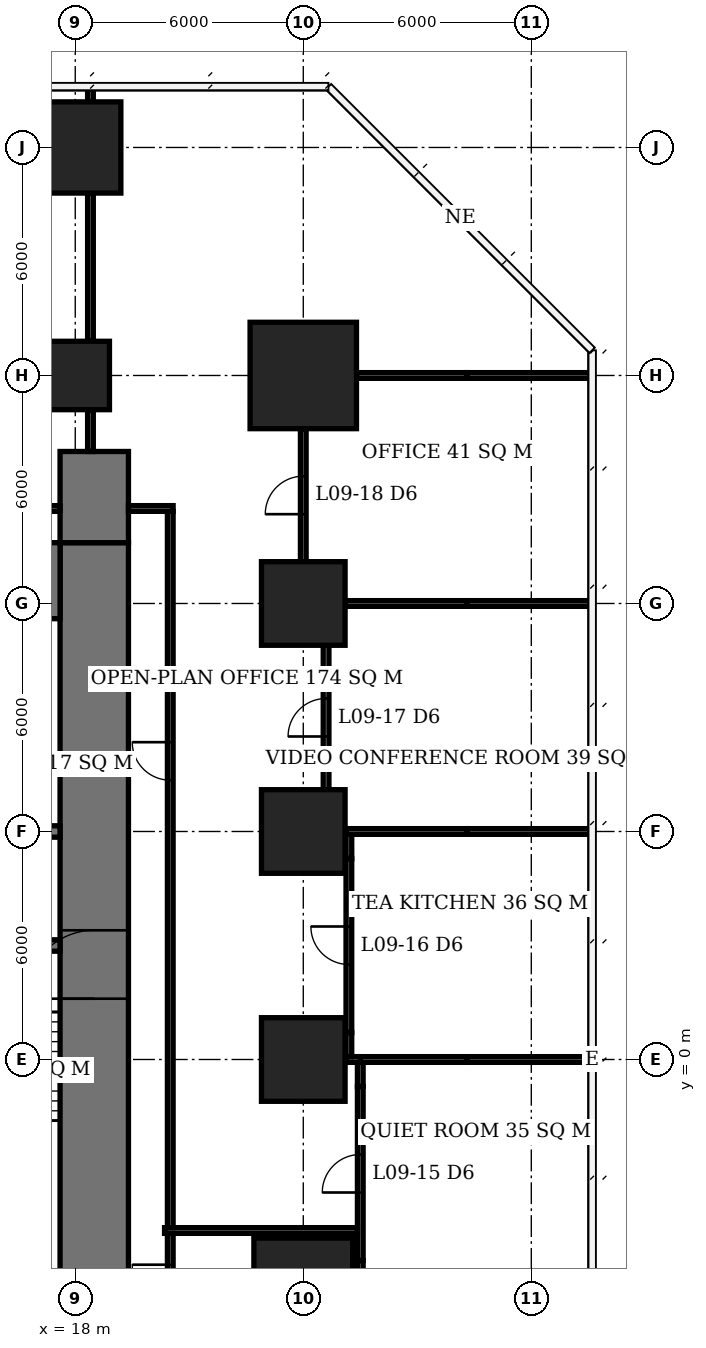
"""IFC4 building model, lengths in metres.
Left out: names, types, materials, properties, quantities, classifications, styles, units other than length and angle.
Written with IfcOpenShell. Run it as: python <this file> out.ifc"""

import sys

from ifc_helpers import new_model, si_unit, direction, frame, frame_2d, origin, origin_2d, place, context, subcontext, project, spatial, rectangle, extrude, element, fill, save


model = new_model("IFC4")
c1 = context("Model", 3, precision=1e-05, world=origin(), true_north=direction((0.0, 1.0)))
c2 = subcontext(c1, "Body", "Model", "MODEL_VIEW")
j1 = project(units=[si_unit("LENGTHUNIT", "METRE"), si_unit("PLANEANGLEUNIT", "RADIAN")], contexts=[c1])
p1 = place(None, origin())
s1 = spatial("IfcSite", under=j1, at=p1, CompositionType="ELEMENT")
p2 = place(p1, origin())
s2 = spatial("IfcBuilding", under=s1, at=p2, CompositionType="ELEMENT")
p3 = place(p2, frame((0.0, 0.0, 41.6)))
s3 = spatial("IfcBuildingStorey", under=s2, at=p3, CompositionType="ELEMENT", Elevation=41.6)
p4 = place(p3, frame((18.0, 18.0, 0.0), z_axis=(0.0, 0.0, 1.0), x_axis=(1.0, 0.0, 0.0)))
e1 = element("IfcColumn", 1, at=p4, inside=s3, PredefinedType="COLUMN", context=c2, shape_type="SweptSolid", body=[
    extrude(rectangle(XDim=1.8, YDim=1.8, at=origin_2d()), origin(), (0.0, 0.0, 1.0), 3.9),
])
p5 = place(p3, frame((18.0, 24.0, 0.0), z_axis=(0.0, 0.0, 1.0), x_axis=(1.0, 0.0, 0.0)))
e2 = element("IfcColumn", 2, at=p5, inside=s3, PredefinedType="COLUMN", context=c2, shape_type="SweptSolid", body=[
    extrude(rectangle(XDim=2.4, YDim=2.4, at=origin_2d()), origin(), (0.0, 0.0, 1.0), 3.9),
])
p6 = place(p3, frame((24.0, -6.0, 0.0), z_axis=(0.0, 0.0, 1.0), x_axis=(1.0, 0.0, 0.0)))
e3 = element("IfcColumn", 3, at=p6, inside=s3, PredefinedType="COLUMN", context=c2, shape_type="SweptSolid", body=[
    extrude(rectangle(XDim=2.6, YDim=2.6, at=origin_2d()), origin(), (0.0, 0.0, 1.0), 3.9),
])
for number, where, z_axis, x_axis in (
    (4, (24.0, 0.0, 0.0), (0.0, 0.0, 1.0), (1.0, 0.0, 0.0)),
    (5, (24.0, 6.0, 0.0), (0.0, 0.0, 1.0), (1.0, 0.0, 0.0)),
    (6, (24.0, 12.0, 0.0), (0.0, 0.0, 1.0), (1.0, 0.0, 0.0)),
):
    element("IfcColumn", number, at=place(p3, frame(where, z_axis=z_axis, x_axis=x_axis)), inside=s3, PredefinedType="COLUMN", context=c2, shape_type="SweptSolid", body=[
        extrude(rectangle(XDim=2.2, YDim=2.2, at=origin_2d()), origin(), (0.0, 0.0, 1.0), 3.9),
    ])
p7 = place(p3, frame((24.0, 18.0, 0.0), z_axis=(0.0, 0.0, 1.0), x_axis=(1.0, 0.0, 0.0)))
e7 = element("IfcColumn", 7, at=p7, inside=s3, PredefinedType="COLUMN", context=c2, shape_type="SweptSolid", body=[
    extrude(rectangle(XDim=2.8, YDim=2.8, at=origin_2d()), origin(), (0.0, 0.0, 1.0), 3.9),
])
p8 = place(p3, frame((-5.6, 12.6, 0.0), z_axis=(0.0, 0.0, 1.0), x_axis=(1.0, 0.0, 0.0)))
e8 = element("IfcWall", 8, at=p8, inside=s3, PredefinedType="SHEAR", context=c2, shape_type="SweptSolid", body=[
    extrude(rectangle(XDim=23.2, YDim=2.0, at=frame_2d((11.6, 0.0))), origin(), (0.0, 0.0, 1.0), 3.9),
])
p9 = place(p3, frame((18.5, -7.6, 0.0), z_axis=(0.0, 0.0, 1.0), x_axis=(0.0, 1.0, 0.0)))
e9 = element("IfcWall", 9, at=p9, inside=s3, PredefinedType="SHEAR", context=c2, shape_type="SweptSolid", body=[
    extrude(rectangle(XDim=21.2, YDim=1.8, at=frame_2d((10.6, 0.0))), origin(), (0.0, 0.0, 1.0), 3.9),
])
p10 = place(p9, frame((9.2, 0.0, 0.0)))
e10 = element("IfcOpeningElement", 10, at=p10, cuts=e9, PredefinedType="OPENING", context=c2, shape_type="SweptSolid", body=[
    extrude(rectangle(XDim=1.8, YDim=2.4, at=frame_2d((0.9, 1.2))), frame((0.0, 0.91, 0.0), z_axis=(0.0, -1.0, 0.0), x_axis=(1.0, 0.0, 0.0)), (0.0, 0.0, 1.0), 1.82),
])
p11 = place(p3, frame((18.5, 13.6, 0.0), z_axis=(0.0, 0.0, 1.0), x_axis=(0.0, 1.0, 0.0)))
e11 = element("IfcWall", 11, at=p11, inside=s3, PredefinedType="SHEAR", context=c2, shape_type="SweptSolid", body=[
    extrude(rectangle(XDim=2.4, YDim=1.8, at=frame_2d((1.2, 0.0))), origin(), (0.0, 0.0, 1.0), 3.9),
])
p12 = place(p3, frame((12.15, 3.0, 0.0), z_axis=(0.0, 0.0, 1.0), x_axis=(1.0, 0.0, 0.0)))
e12 = element("IfcWall", 12, at=p12, inside=s3, PredefinedType="SHEAR", context=c2, shape_type="SweptSolid", body=[
    extrude(rectangle(XDim=5.45, YDim=0.3, at=frame_2d((2.725, 0.0))), origin(), (0.0, 0.0, 1.0), 3.9),
])
p13 = place(p12, frame((3.25, 0.0, 0.0)))
e13 = element("IfcOpeningElement", 13, at=p13, cuts=e12, PredefinedType="OPENING", context=c2, shape_type="SweptSolid", body=[
    extrude(rectangle(XDim=1.2, YDim=2.1, at=frame_2d((0.6, 1.05))), frame((0.0, 0.16, 0.0), z_axis=(0.0, -1.0, 0.0), x_axis=(1.0, 0.0, 0.0)), (0.0, 0.0, 1.0), 0.32),
])
p14 = place(p12, frame((0.45, 0.0, 0.0)))
e14 = element("IfcOpeningElement", 14, at=p14, cuts=e12, PredefinedType="OPENING", context=c2, shape_type="SweptSolid", body=[
    extrude(rectangle(XDim=0.9, YDim=2.1, at=frame_2d((0.45, 1.05))), frame((0.0, 0.16, 0.0), z_axis=(0.0, -1.0, 0.0), x_axis=(1.0, 0.0, 0.0)), (0.0, 0.0, 1.0), 0.32),
])
p15 = place(p3, frame((-0.15, 6.0, 0.0), z_axis=(0.0, 0.0, 1.0), x_axis=(1.0, 0.0, 0.0)))
e15 = element("IfcWall", 15, at=p15, inside=s3, PredefinedType="SHEAR", context=c2, shape_type="SweptSolid", body=[
    extrude(rectangle(XDim=17.75, YDim=0.3, at=frame_2d((8.875, 0.0))), origin(), (0.0, 0.0, 1.0), 3.9),
])
p16 = place(p15, frame((13.15, 0.0, 0.0)))
e16 = element("IfcOpeningElement", 16, at=p16, cuts=e15, PredefinedType="OPENING", context=c2, shape_type="SweptSolid", body=[
    extrude(rectangle(XDim=0.9, YDim=2.1, at=frame_2d((0.45, 1.05))), frame((0.0, 0.16, 0.0), z_axis=(0.0, -1.0, 0.0), x_axis=(1.0, 0.0, 0.0)), (0.0, 0.0, 1.0), 0.32),
])
p17 = place(p15, frame((16.25, 0.0, 0.0)))
e17 = element("IfcOpeningElement", 17, at=p17, cuts=e15, PredefinedType="OPENING", context=c2, shape_type="SweptSolid", body=[
    extrude(rectangle(XDim=1.0, YDim=2.1, at=frame_2d((0.5, 1.05))), frame((0.0, 0.16, 0.0), z_axis=(0.0, -1.0, 0.0), x_axis=(1.0, 0.0, 0.0)), (0.0, 0.0, 1.0), 0.32),
])
p18 = place(p15, frame((1.1, 0.0, 0.0)))
e18 = element("IfcOpeningElement", 18, at=p18, cuts=e15, PredefinedType="OPENING", context=c2, shape_type="SweptSolid", body=[
    extrude(rectangle(XDim=1.1, YDim=2.1, at=frame_2d((0.55, 1.05))), frame((0.0, 0.16, 0.0), z_axis=(0.0, -1.0, 0.0), x_axis=(1.0, 0.0, 0.0)), (0.0, 0.0, 1.0), 0.32),
])
p19 = place(p15, frame((4.1, 0.0, 0.0)))
e19 = element("IfcOpeningElement", 19, at=p19, cuts=e15, PredefinedType="OPENING", context=c2, shape_type="SweptSolid", body=[
    extrude(rectangle(XDim=1.1, YDim=2.1, at=frame_2d((0.55, 1.05))), frame((0.0, 0.16, 0.0), z_axis=(0.0, -1.0, 0.0), x_axis=(1.0, 0.0, 0.0)), (0.0, 0.0, 1.0), 0.32),
])
p20 = place(p15, frame((7.1, 0.0, 0.0)))
e20 = element("IfcOpeningElement", 20, at=p20, cuts=e15, PredefinedType="OPENING", context=c2, shape_type="SweptSolid", body=[
    extrude(rectangle(XDim=1.1, YDim=2.1, at=frame_2d((0.55, 1.05))), frame((0.0, 0.16, 0.0), z_axis=(0.0, -1.0, 0.0), x_axis=(1.0, 0.0, 0.0)), (0.0, 0.0, 1.0), 0.32),
])
p21 = place(p15, frame((10.1, 0.0, 0.0)))
e21 = element("IfcOpeningElement", 21, at=p21, cuts=e15, PredefinedType="OPENING", context=c2, shape_type="SweptSolid", body=[
    extrude(rectangle(XDim=1.1, YDim=2.1, at=frame_2d((0.55, 1.05))), frame((0.0, 0.16, 0.0), z_axis=(0.0, -1.0, 0.0), x_axis=(1.0, 0.0, 0.0)), (0.0, 0.0, 1.0), 0.32),
])
p22 = place(p3, frame((25.125, 0.0, 0.0), z_axis=(0.0, 0.0, 1.0), x_axis=(1.0, 0.0, 0.0)))
e22 = element("IfcWall", 22, at=p22, inside=s3, PredefinedType="PARTITIONING", context=c2, shape_type="SweptSolid", body=[
    extrude(rectangle(XDim=0.45, YDim=0.15, at=frame_2d((0.225, 0.0))), origin(), (0.0, 0.0, 1.0), 2.65),
])
p23 = place(p3, frame((25.5, 0.0, 0.0), z_axis=(0.0, 0.0, 1.0), x_axis=(1.0, 0.0, 0.0)))
e23 = element("IfcWall", 23, at=p23, inside=s3, PredefinedType="PARTITIONING", context=c2, shape_type="SweptSolid", body=[
    extrude(rectangle(XDim=2.81, YDim=0.15, at=frame_2d((1.405, 0.0))), origin(), (0.0, 0.0, 1.0), 2.65),
])
p24 = place(p3, frame((28.31, 0.0, 0.0), z_axis=(0.0, 0.0, 1.0), x_axis=(1.0, 0.0, 0.0)))
e24 = element("IfcWall", 24, at=p24, inside=s3, PredefinedType="PARTITIONING", context=c2, shape_type="SweptSolid", body=[
    extrude(rectangle(XDim=3.24, YDim=0.15, at=frame_2d((1.62, 0.0))), origin(), (0.0, 0.0, 1.0), 3.65),
])
p25 = place(p3, frame((25.125, 6.0, 0.0), z_axis=(0.0, 0.0, 1.0), x_axis=(1.0, 0.0, 0.0)))
e25 = element("IfcWall", 25, at=p25, inside=s3, PredefinedType="PARTITIONING", context=c2, shape_type="SweptSolid", body=[
    extrude(rectangle(XDim=3.185, YDim=0.15, at=frame_2d((1.593, 0.0))), origin(), (0.0, 0.0, 1.0), 2.65),
])
p26 = place(p3, frame((28.31, 6.0, 0.0), z_axis=(0.0, 0.0, 1.0), x_axis=(1.0, 0.0, 0.0)))
e26 = element("IfcWall", 26, at=p26, inside=s3, PredefinedType="PARTITIONING", context=c2, shape_type="SweptSolid", body=[
    extrude(rectangle(XDim=3.29, YDim=0.15, at=frame_2d((1.645, 0.0))), origin(), (0.0, 0.0, 1.0), 3.65),
])
p27 = place(p3, frame((25.1, 12.0, 0.0), z_axis=(0.0, 0.0, 1.0), x_axis=(1.0, 0.0, 0.0)))
e27 = element("IfcWall", 27, at=p27, inside=s3, PredefinedType="PARTITIONING", context=c2, shape_type="SweptSolid", body=[
    extrude(rectangle(XDim=3.21, YDim=0.15, at=frame_2d((1.605, 0.0))), origin(), (0.0, 0.0, 1.0), 2.65),
])
p28 = place(p3, frame((28.31, 12.0, 0.0), z_axis=(0.0, 0.0, 1.0), x_axis=(1.0, 0.0, 0.0)))
e28 = element("IfcWall", 28, at=p28, inside=s3, PredefinedType="PARTITIONING", context=c2, shape_type="SweptSolid", body=[
    extrude(rectangle(XDim=3.29, YDim=0.15, at=frame_2d((1.645, 0.0))), origin(), (0.0, 0.0, 1.0), 3.65),
])
p29 = place(p3, frame((25.4, 18.0, 0.0), z_axis=(0.0, 0.0, 1.0), x_axis=(1.0, 0.0, 0.0)))
e29 = element("IfcWall", 29, at=p29, inside=s3, PredefinedType="PARTITIONING", context=c2, shape_type="SweptSolid", body=[
    extrude(rectangle(XDim=2.91, YDim=0.15, at=frame_2d((1.455, 0.0))), origin(), (0.0, 0.0, 1.0), 2.65),
])
p30 = place(p3, frame((28.31, 18.0, 0.0), z_axis=(0.0, 0.0, 1.0), x_axis=(1.0, 0.0, 0.0)))
e30 = element("IfcWall", 30, at=p30, inside=s3, PredefinedType="PARTITIONING", context=c2, shape_type="SweptSolid", body=[
    extrude(rectangle(XDim=3.29, YDim=0.15, at=frame_2d((1.645, 0.0))), origin(), (0.0, 0.0, 1.0), 3.65),
])
p31 = place(p3, frame((24.0, 13.1, 0.0), z_axis=(0.0, 0.0, 1.0), x_axis=(0.0, 1.0, 0.0)))
e31 = element("IfcWall", 31, at=p31, inside=s3, PredefinedType="PARTITIONING", context=c2, shape_type="SweptSolid", body=[
    extrude(rectangle(XDim=3.5, YDim=0.15, at=frame_2d((1.75, 0.0))), origin(), (0.0, 0.0, 1.0), 3.65),
])
p32 = place(p31, frame((1.25, 0.0, 0.0)))
e32 = element("IfcOpeningElement", 32, at=p32, cuts=e31, PredefinedType="OPENING", context=c2, shape_type="SweptSolid", body=[
    extrude(rectangle(XDim=1.0, YDim=2.1, at=frame_2d((0.5, 1.05))), frame((0.0, 0.085, 0.0), z_axis=(0.0, -1.0, 0.0), x_axis=(1.0, 0.0, 0.0)), (0.0, 0.0, 1.0), 0.17),
])
p33 = place(p3, frame((24.6, 7.1, 0.0), z_axis=(0.0, 0.0, 1.0), x_axis=(0.0, 1.0, 0.0)))
e33 = element("IfcWall", 33, at=p33, inside=s3, PredefinedType="PARTITIONING", context=c2, shape_type="SweptSolid", body=[
    extrude(rectangle(XDim=3.8, YDim=0.15, at=frame_2d((1.9, 0.0))), origin(), (0.0, 0.0, 1.0), 3.65),
])
p34 = place(p33, frame((1.4, 0.0, 0.0)))
e34 = element("IfcOpeningElement", 34, at=p34, cuts=e33, PredefinedType="OPENING", context=c2, shape_type="SweptSolid", body=[
    extrude(rectangle(XDim=1.0, YDim=2.1, at=frame_2d((0.5, 1.05))), frame((0.0, 0.085, 0.0), z_axis=(0.0, -1.0, 0.0), x_axis=(1.0, 0.0, 0.0)), (0.0, 0.0, 1.0), 0.17),
])
p35 = place(p3, frame((25.2, 0.075, 0.0), z_axis=(0.0, 0.0, 1.0), x_axis=(0.0, 1.0, 0.0)))
e35 = element("IfcWall", 35, at=p35, inside=s3, PredefinedType="PARTITIONING", context=c2, shape_type="SweptSolid", body=[
    extrude(rectangle(XDim=0.635, YDim=0.15, at=frame_2d((0.317, 0.0))), origin(), (0.0, 0.0, 1.0), 2.65),
])
p36 = place(p3, frame((25.2, 0.71, 0.0), z_axis=(0.0, 0.0, 1.0), x_axis=(0.0, 1.0, 0.0)))
e36 = element("IfcWall", 36, at=p36, inside=s3, PredefinedType="PARTITIONING", context=c2, shape_type="SweptSolid", body=[
    extrude(rectangle(XDim=4.58, YDim=0.15, at=frame_2d((2.29, 0.0))), origin(), (0.0, 0.0, 1.0), 3.65),
])
p37 = place(p36, frame((1.79, 0.0, 0.0)))
e37 = element("IfcOpeningElement", 37, at=p37, cuts=e36, PredefinedType="OPENING", context=c2, shape_type="SweptSolid", body=[
    extrude(rectangle(XDim=1.0, YDim=2.1, at=frame_2d((0.5, 1.05))), frame((0.0, 0.085, 0.0), z_axis=(0.0, -1.0, 0.0), x_axis=(1.0, 0.0, 0.0)), (0.0, 0.0, 1.0), 0.17),
])
for number, where, z_axis, x_axis in (
    (38, (25.2, 5.29, 0.0), (0.0, 0.0, 1.0), (0.0, 1.0, 0.0)),
    (39, (25.5, -5.925, 0.0), (0.0, 0.0, 1.0), (0.0, 1.0, 0.0)),
):
    element("IfcWall", number, at=place(p3, frame(where, z_axis=z_axis, x_axis=x_axis)), inside=s3, PredefinedType="PARTITIONING", context=c2, shape_type="SweptSolid", body=[
        extrude(rectangle(XDim=0.635, YDim=0.15, at=frame_2d((0.317, 0.0))), origin(), (0.0, 0.0, 1.0), 2.65),
    ])
p38 = place(p3, frame((25.5, -5.29, 0.0), z_axis=(0.0, 0.0, 1.0), x_axis=(0.0, 1.0, 0.0)))
e40 = element("IfcWall", 40, at=p38, inside=s3, PredefinedType="PARTITIONING", context=c2, shape_type="SweptSolid", body=[
    extrude(rectangle(XDim=4.58, YDim=0.15, at=frame_2d((2.29, 0.0))), origin(), (0.0, 0.0, 1.0), 3.65),
])
p39 = place(p38, frame((1.79, 0.0, 0.0)))
e41 = element("IfcOpeningElement", 41, at=p39, cuts=e40, PredefinedType="OPENING", context=c2, shape_type="SweptSolid", body=[
    extrude(rectangle(XDim=1.0, YDim=2.1, at=frame_2d((0.5, 1.05))), frame((0.0, 0.085, 0.0), z_axis=(0.0, -1.0, 0.0), x_axis=(1.0, 0.0, 0.0)), (0.0, 0.0, 1.0), 0.17),
])
p40 = place(p3, frame((25.5, -0.71, 0.0), z_axis=(0.0, 0.0, 1.0), x_axis=(0.0, 1.0, 0.0)))
e42 = element("IfcWall", 42, at=p40, inside=s3, PredefinedType="PARTITIONING", context=c2, shape_type="SweptSolid", body=[
    extrude(rectangle(XDim=0.635, YDim=0.15, at=frame_2d((0.317, 0.0))), origin(), (0.0, 0.0, 1.0), 2.65),
])
p41 = place(p3, frame((4.575, 14.5, 0.0), z_axis=(0.0, 0.0, 1.0), x_axis=(1.0, 0.0, 0.0)))
e43 = element("IfcWall", 43, at=p41, inside=s3, PredefinedType="PARTITIONING", context=c2, shape_type="SweptSolid", body=[
    extrude(rectangle(XDim=13.025, YDim=0.15, at=frame_2d((6.513, 0.0))), origin(), (0.0, 0.0, 1.0), 3.65),
])
p42 = place(p41, frame((7.94, 0.0, 0.0)))
e44 = element("IfcOpeningElement", 44, at=p42, cuts=e43, PredefinedType="OPENING", context=c2, shape_type="SweptSolid", body=[
    extrude(rectangle(XDim=1.0, YDim=2.1, at=frame_2d((0.5, 1.05))), frame((0.0, 0.085, 0.0), z_axis=(0.0, -1.0, 0.0), x_axis=(1.0, 0.0, 0.0)), (0.0, 0.0, 1.0), 0.17),
])
p43 = place(p3, frame((18.4, 16.0, 0.0), z_axis=(0.0, 0.0, 1.0), x_axis=(0.0, 1.0, 0.0)))
e45 = element("IfcWall", 45, at=p43, inside=s3, PredefinedType="PARTITIONING", context=c2, shape_type="SweptSolid", body=[
    extrude(rectangle(XDim=1.1, YDim=0.15, at=frame_2d((0.55, 0.0))), origin(), (0.0, 0.0, 1.0), 3.65),
])
p44 = place(p3, frame((18.4, 18.9, 0.0), z_axis=(0.0, 0.0, 1.0), x_axis=(0.0, 1.0, 0.0)))
e46 = element("IfcWall", 46, at=p44, inside=s3, PredefinedType="PARTITIONING", context=c2, shape_type="SweptSolid", body=[
    extrude(rectangle(XDim=3.9, YDim=0.15, at=frame_2d((1.95, 0.0))), origin(), (0.0, 0.0, 1.0), 3.65),
])
p45 = place(p3, frame((18.4, 25.2, 0.0), z_axis=(0.0, 0.0, 1.0), x_axis=(0.0, 1.0, 0.0)))
e47 = element("IfcWall", 47, at=p45, inside=s3, PredefinedType="PARTITIONING", context=c2, shape_type="SweptSolid", body=[
    extrude(rectangle(XDim=0.35, YDim=0.15, at=frame_2d((0.175, 0.0))), origin(), (0.0, 0.0, 1.0), 3.65),
])
p46 = place(p3, frame((19.4, 14.5, 0.0), z_axis=(0.0, 0.0, 1.0), x_axis=(1.0, 0.0, 0.0)))
e48 = element("IfcWall", 48, at=p46, inside=s3, PredefinedType="PARTITIONING", context=c2, shape_type="SweptSolid", body=[
    extrude(rectangle(XDim=1.175, YDim=0.15, at=frame_2d((0.587, 0.0))), origin(), (0.0, 0.0, 1.0), 3.65),
])
p47 = place(p3, frame((20.5, -8.425, 0.0), z_axis=(0.0, 0.0, 1.0), x_axis=(0.0, 1.0, 0.0)))
e49 = element("IfcWall", 49, at=p47, inside=s3, PredefinedType="PARTITIONING", context=c2, shape_type="SweptSolid", body=[
    extrude(rectangle(XDim=3.85, YDim=0.15, at=frame_2d((1.925, 0.0))), origin(), (0.0, 0.0, 1.0), 3.65),
])
p48 = place(p47, frame((2.025, 0.0, 0.0)))
e50 = element("IfcOpeningElement", 50, at=p48, cuts=e49, PredefinedType="OPENING", context=c2, shape_type="SweptSolid", body=[
    extrude(rectangle(XDim=1.0, YDim=2.1, at=frame_2d((0.5, 1.05))), frame((0.0, 0.085, 0.0), z_axis=(0.0, -1.0, 0.0), x_axis=(1.0, 0.0, 0.0)), (0.0, 0.0, 1.0), 0.17),
])
p49 = place(p3, frame((20.5, -4.425, 0.0), z_axis=(0.0, 0.0, 1.0), x_axis=(0.0, 1.0, 0.0)))
e51 = element("IfcWall", 51, at=p49, inside=s3, PredefinedType="PARTITIONING", context=c2, shape_type="SweptSolid", body=[
    extrude(rectangle(XDim=18.85, YDim=0.15, at=frame_2d((9.425, 0.0))), origin(), (0.0, 0.0, 1.0), 3.65),
])
p50 = place(p49, frame((11.775, 0.0, 0.0)))
e52 = element("IfcOpeningElement", 52, at=p50, cuts=e51, PredefinedType="OPENING", context=c2, shape_type="SweptSolid", body=[
    extrude(rectangle(XDim=1.0, YDim=2.1, at=frame_2d((0.5, 1.05))), frame((0.0, 0.085, 0.0), z_axis=(0.0, -1.0, 0.0), x_axis=(1.0, 0.0, 0.0)), (0.0, 0.0, 1.0), 0.17),
])
p51 = place(p3, frame((20.35, -4.5, 0.0), z_axis=(0.0, 0.0, 1.0), x_axis=(1.0, 0.0, 0.0)))
e53 = element("IfcWall", 53, at=p51, inside=s3, PredefinedType="PARTITIONING", context=c2, shape_type="SweptSolid", body=[
    extrude(rectangle(XDim=5.075, YDim=0.15, at=frame_2d((2.538, 0.0))), origin(), (0.0, 0.0, 1.0), 3.65),
])
p52 = place(p10, origin())
e54 = element("IfcDoor", 54, at=p52, inside=s3, OperationType="DOUBLE_DOOR_SINGLE_SWING", PredefinedType="DOOR", context=c2, shape_type="SweptSolid", body=[
    extrude(rectangle(XDim=1.8, YDim=2.4, at=frame_2d((0.9, 1.2))), frame((0.0, 0.025, 0.0), z_axis=(0.0, -1.0, 0.0), x_axis=(1.0, 0.0, 0.0)), (0.0, 0.0, 1.0), 0.05),
])
fill(e10, e54)
p53 = place(p39, origin())
e55 = element("IfcDoor", 55, at=p53, inside=s3, OperationType="SINGLE_SWING_LEFT", PredefinedType="DOOR", context=c2, shape_type="SweptSolid", body=[
    extrude(rectangle(XDim=1.0, YDim=2.1, at=frame_2d((0.5, 1.05))), frame((0.0, 0.025, 0.0), z_axis=(0.0, -1.0, 0.0), x_axis=(1.0, 0.0, 0.0)), (0.0, 0.0, 1.0), 0.05),
])
fill(e41, e55)
p54 = place(p37, origin())
e56 = element("IfcDoor", 56, at=p54, inside=s3, OperationType="SINGLE_SWING_RIGHT", PredefinedType="DOOR", context=c2, shape_type="SweptSolid", body=[
    extrude(rectangle(XDim=1.0, YDim=2.1, at=frame_2d((0.5, 1.05))), frame((0.0, 0.025, 0.0), z_axis=(0.0, -1.0, 0.0), x_axis=(1.0, 0.0, 0.0)), (0.0, 0.0, 1.0), 0.05),
])
fill(e37, e56)
p55 = place(p34, origin())
e57 = element("IfcDoor", 57, at=p55, inside=s3, OperationType="SINGLE_SWING_LEFT", PredefinedType="DOOR", context=c2, shape_type="SweptSolid", body=[
    extrude(rectangle(XDim=1.0, YDim=2.1, at=frame_2d((0.5, 1.05))), frame((0.0, 0.025, 0.0), z_axis=(0.0, -1.0, 0.0), x_axis=(1.0, 0.0, 0.0)), (0.0, 0.0, 1.0), 0.05),
])
fill(e34, e57)
p56 = place(p32, origin())
e58 = element("IfcDoor", 58, at=p56, inside=s3, OperationType="SINGLE_SWING_LEFT", PredefinedType="DOOR", context=c2, shape_type="SweptSolid", body=[
    extrude(rectangle(XDim=1.0, YDim=2.1, at=frame_2d((0.5, 1.05))), frame((0.0, 0.025, 0.0), z_axis=(0.0, -1.0, 0.0), x_axis=(1.0, 0.0, 0.0)), (0.0, 0.0, 1.0), 0.05),
])
fill(e32, e58)
p57 = place(p48, origin())
e59 = element("IfcDoor", 59, at=p57, inside=s3, OperationType="SINGLE_SWING_RIGHT", PredefinedType="DOOR", context=c2, shape_type="SweptSolid", body=[
    extrude(rectangle(XDim=1.0, YDim=2.1, at=frame_2d((0.5, 1.05))), frame((0.0, 0.025, 0.0), z_axis=(0.0, -1.0, 0.0), x_axis=(1.0, 0.0, 0.0)), (0.0, 0.0, 1.0), 0.05),
])
fill(e50, e59)
p58 = place(p50, origin())
e60 = element("IfcDoor", 60, at=p58, inside=s3, OperationType="SINGLE_SWING_RIGHT", PredefinedType="DOOR", context=c2, shape_type="SweptSolid", body=[
    extrude(rectangle(XDim=1.0, YDim=2.1, at=frame_2d((0.5, 1.05))), frame((0.0, 0.025, 0.0), z_axis=(0.0, -1.0, 0.0), x_axis=(1.0, 0.0, 0.0)), (0.0, 0.0, 1.0), 0.05),
])
fill(e52, e60)
save(model, sys.argv[1])
